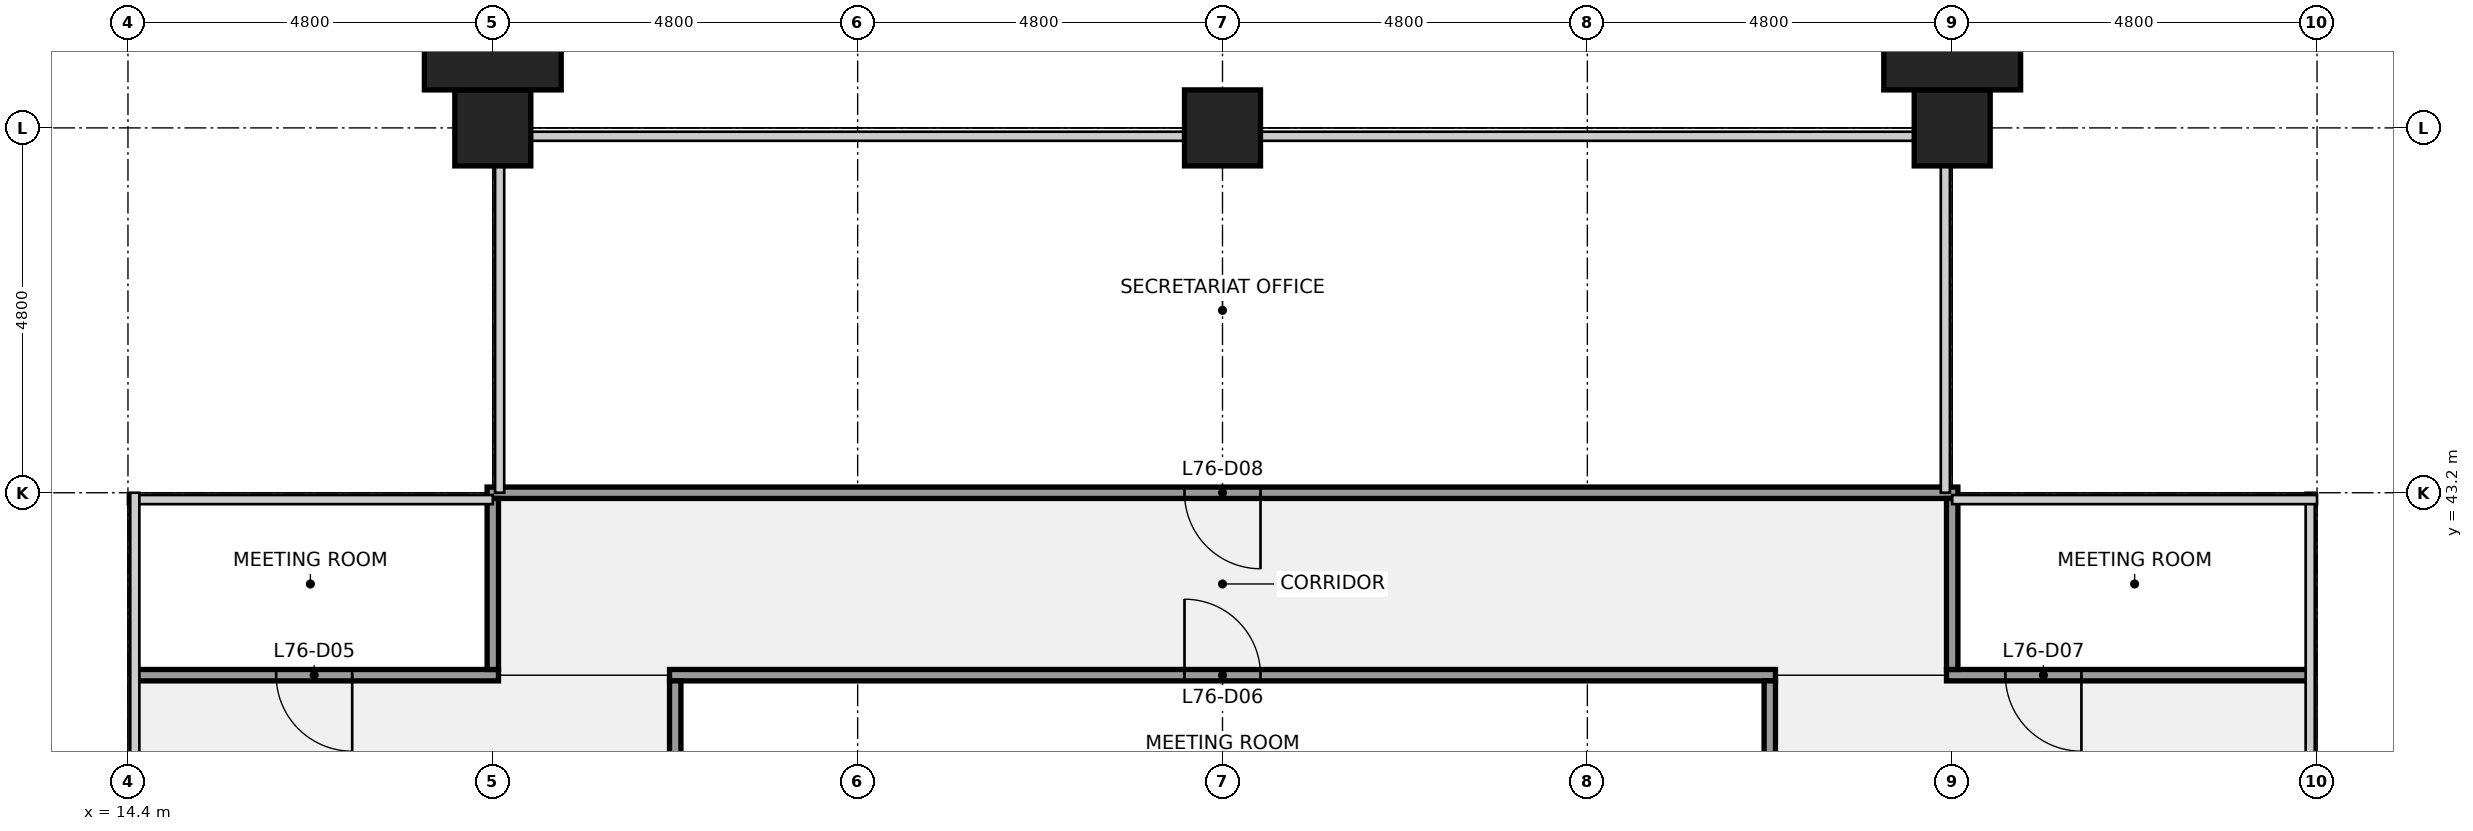
"""IFC4 building model, lengths in metres.
Left out: names, types, materials, properties, quantities, classifications, styles, units other than length and angle.
Written with IfcOpenShell. Run it as: python <this file> out.ifc"""

import sys

from ifc_helpers import new_model, si_unit, direction, frame, frame_2d, origin, origin_2d, place, context, subcontext, project, spatial, rectangle, extrude, element, fill, save


model = new_model("IFC4")
c1 = context("Model", 3, precision=1e-05, world=origin(), true_north=direction((0.0, 1.0)))
c2 = subcontext(c1, "Body", "Model", "MODEL_VIEW")
j1 = project(units=[si_unit("LENGTHUNIT", "METRE"), si_unit("PLANEANGLEUNIT", "RADIAN")], contexts=[c1])
p1 = place(None, origin())
s1 = spatial("IfcSite", under=j1, at=p1, CompositionType="ELEMENT")
p2 = place(p1, origin())
s2 = spatial("IfcBuilding", under=s1, at=p2, CompositionType="ELEMENT")
p3 = place(p2, frame((0.0, 0.0, 342.3)))
s3 = spatial("IfcBuildingStorey", under=s2, at=p3, CompositionType="ELEMENT", Elevation=342.3)
for number, where, z_axis, x_axis in (
    (1, (19.2, 48.0, 0.0), (0.0, 0.0, 1.0), (1.0, 0.0, 0.0)),
    (2, (28.8, 48.0, 0.0), (0.0, 0.0, 1.0), (1.0, 0.0, 0.0)),
    (3, (38.4, 48.0, 0.0), (0.0, 0.0, 1.0), (1.0, 0.0, 0.0)),
):
    element("IfcColumn", number, at=place(p3, frame(where, z_axis=z_axis, x_axis=x_axis)), inside=s3, PredefinedType="COLUMN", context=c2, shape_type="SweptSolid", body=[
        extrude(rectangle(XDim=1.0, YDim=1.0, at=origin_2d()), origin(), (0.0, 0.0, 1.0), 4.0),
    ])
p4 = place(p3, frame((14.5, 40.8, 0.0), z_axis=(0.0, 0.0, 1.0), x_axis=(1.0, 0.0, 0.0)))
e4 = element("IfcWall", 4, at=p4, inside=s3, PredefinedType="PARTITIONING", context=c2, shape_type="SweptSolid", body=[
    extrude(rectangle(XDim=4.775, YDim=0.15, at=frame_2d((2.387, 0.0))), origin(), (0.0, 0.0, 1.0), 2.87),
])
p5 = place(p4, frame((1.85, 0.0, 0.0)))
e5 = element("IfcOpeningElement", 5, at=p5, cuts=e4, PredefinedType="OPENING", context=c2, shape_type="SweptSolid", body=[
    extrude(rectangle(XDim=1.0, YDim=2.1, at=frame_2d((0.5, 1.05))), frame((0.0, 0.085, 0.0), z_axis=(0.0, -1.0, 0.0), x_axis=(1.0, 0.0, 0.0)), (0.0, 0.0, 1.0), 0.17),
])
p6 = place(p3, frame((21.525, 40.8, 0.0), z_axis=(0.0, 0.0, 1.0), x_axis=(1.0, 0.0, 0.0)))
e6 = element("IfcWall", 6, at=p6, inside=s3, PredefinedType="PARTITIONING", context=c2, shape_type="SweptSolid", body=[
    extrude(rectangle(XDim=14.55, YDim=0.15, at=frame_2d((7.275, 0.0))), origin(), (0.0, 0.0, 1.0), 2.87),
])
p7 = place(p6, frame((6.775, 0.0, 0.0)))
e7 = element("IfcOpeningElement", 7, at=p7, cuts=e6, PredefinedType="OPENING", context=c2, shape_type="SweptSolid", body=[
    extrude(rectangle(XDim=1.0, YDim=2.1, at=frame_2d((0.5, 1.05))), frame((0.0, 0.085, 0.0), z_axis=(0.0, -1.0, 0.0), x_axis=(1.0, 0.0, 0.0)), (0.0, 0.0, 1.0), 0.17),
])
p8 = place(p3, frame((38.325, 40.8, 0.0), z_axis=(0.0, 0.0, 1.0), x_axis=(1.0, 0.0, 0.0)))
e8 = element("IfcWall", 8, at=p8, inside=s3, PredefinedType="PARTITIONING", context=c2, shape_type="SweptSolid", body=[
    extrude(rectangle(XDim=4.775, YDim=0.15, at=frame_2d((2.388, 0.0))), origin(), (0.0, 0.0, 1.0), 2.87),
])
p9 = place(p8, frame((0.775, 0.0, 0.0)))
e9 = element("IfcOpeningElement", 9, at=p9, cuts=e8, PredefinedType="OPENING", context=c2, shape_type="SweptSolid", body=[
    extrude(rectangle(XDim=1.0, YDim=2.1, at=frame_2d((0.5, 1.05))), frame((0.0, 0.085, 0.0), z_axis=(0.0, -1.0, 0.0), x_axis=(1.0, 0.0, 0.0)), (0.0, 0.0, 1.0), 0.17),
])
p10 = place(p3, frame((19.125, 43.2, 0.0), z_axis=(0.0, 0.0, 1.0), x_axis=(1.0, 0.0, 0.0)))
e10 = element("IfcWall", 10, at=p10, inside=s3, PredefinedType="PARTITIONING", context=c2, shape_type="SweptSolid", body=[
    extrude(rectangle(XDim=19.35, YDim=0.15, at=frame_2d((9.675, 0.0))), origin(), (0.0, 0.0, 1.0), 2.87),
])
p11 = place(p10, frame((9.175, 0.0, 0.0)))
e11 = element("IfcOpeningElement", 11, at=p11, cuts=e10, PredefinedType="OPENING", context=c2, shape_type="SweptSolid", body=[
    extrude(rectangle(XDim=1.0, YDim=2.1, at=frame_2d((0.5, 1.05))), frame((0.0, 0.085, 0.0), z_axis=(0.0, -1.0, 0.0), x_axis=(1.0, 0.0, 0.0)), (0.0, 0.0, 1.0), 0.17),
])
p12 = place(p3, frame((19.2, 40.875, 0.0), z_axis=(0.0, 0.0, 1.0), x_axis=(0.0, 1.0, 0.0)))
e12 = element("IfcWall", 12, at=p12, inside=s3, PredefinedType="PARTITIONING", context=c2, shape_type="SweptSolid", body=[
    extrude(rectangle(XDim=2.25, YDim=0.15, at=frame_2d((1.125, 0.0))), origin(), (0.0, 0.0, 1.0), 2.87),
])
for number, where, z_axis, x_axis in (
    (13, (21.6, 38.462, 0.0), (0.0, 0.0, 1.0), (0.0, 1.0, 0.0)),
    (14, (36.0, 38.462, 0.0), (0.0, 0.0, 1.0), (0.0, 1.0, 0.0)),
):
    element("IfcWall", number, at=place(p3, frame(where, z_axis=z_axis, x_axis=x_axis)), inside=s3, PredefinedType="PARTITIONING", context=c2, shape_type="SweptSolid", body=[
        extrude(rectangle(XDim=2.263, YDim=0.15, at=frame_2d((1.131, 0.0))), origin(), (0.0, 0.0, 1.0), 2.87),
    ])
p13 = place(p3, frame((38.4, 40.875, 0.0), z_axis=(0.0, 0.0, 1.0), x_axis=(0.0, 1.0, 0.0)))
e15 = element("IfcWall", 15, at=p13, inside=s3, PredefinedType="PARTITIONING", context=c2, shape_type="SweptSolid", body=[
    extrude(rectangle(XDim=2.25, YDim=0.15, at=frame_2d((1.125, 0.0))), origin(), (0.0, 0.0, 1.0), 2.87),
])
for number, where, z_axis, x_axis in (
    (16, (19.2, 49.0, 0.0), (0.0, 0.0, 1.0), (1.0, 0.0, 0.0)),
    (17, (38.4, 49.0, 0.0), (0.0, 0.0, 1.0), (1.0, 0.0, 0.0)),
):
    element("IfcColumn", number, at=place(p3, frame(where, z_axis=z_axis, x_axis=x_axis)), inside=s3, PredefinedType="PILASTER", context=c2, shape_type="SweptSolid", body=[
        extrude(rectangle(XDim=1.8, YDim=1.0, at=origin_2d()), origin(), (0.0, 0.0, 1.0), 4.0),
    ])
p14 = place(p5, origin())
e18 = element("IfcDoor", 18, at=p14, inside=s3, OperationType="SINGLE_SWING_RIGHT", PredefinedType="DOOR", context=c2, shape_type="SweptSolid", body=[
    extrude(rectangle(XDim=1.0, YDim=2.1, at=frame_2d((0.5, 1.05))), frame((0.0, 0.025, 0.0), z_axis=(0.0, -1.0, 0.0), x_axis=(1.0, 0.0, 0.0)), (0.0, 0.0, 1.0), 0.05),
])
fill(e5, e18)
p15 = place(p7, origin())
e19 = element("IfcDoor", 19, at=p15, inside=s3, OperationType="SINGLE_SWING_LEFT", PredefinedType="DOOR", context=c2, shape_type="SweptSolid", body=[
    extrude(rectangle(XDim=1.0, YDim=2.1, at=frame_2d((0.5, 1.05))), frame((0.0, 0.025, 0.0), z_axis=(0.0, -1.0, 0.0), x_axis=(1.0, 0.0, 0.0)), (0.0, 0.0, 1.0), 0.05),
])
fill(e7, e19)
p16 = place(p9, origin())
e20 = element("IfcDoor", 20, at=p16, inside=s3, OperationType="SINGLE_SWING_RIGHT", PredefinedType="DOOR", context=c2, shape_type="SweptSolid", body=[
    extrude(rectangle(XDim=1.0, YDim=2.1, at=frame_2d((0.5, 1.05))), frame((0.0, 0.025, 0.0), z_axis=(0.0, -1.0, 0.0), x_axis=(1.0, 0.0, 0.0)), (0.0, 0.0, 1.0), 0.05),
])
fill(e9, e20)
p17 = place(p11, origin())
e21 = element("IfcDoor", 21, at=p17, inside=s3, OperationType="SINGLE_SWING_RIGHT", PredefinedType="DOOR", context=c2, shape_type="SweptSolid", body=[
    extrude(rectangle(XDim=1.0, YDim=2.1, at=frame_2d((0.5, 1.05))), frame((0.0, 0.025, 0.0), z_axis=(0.0, -1.0, 0.0), x_axis=(1.0, 0.0, 0.0)), (0.0, 0.0, 1.0), 0.05),
])
fill(e11, e21)
save(model, sys.argv[1])
